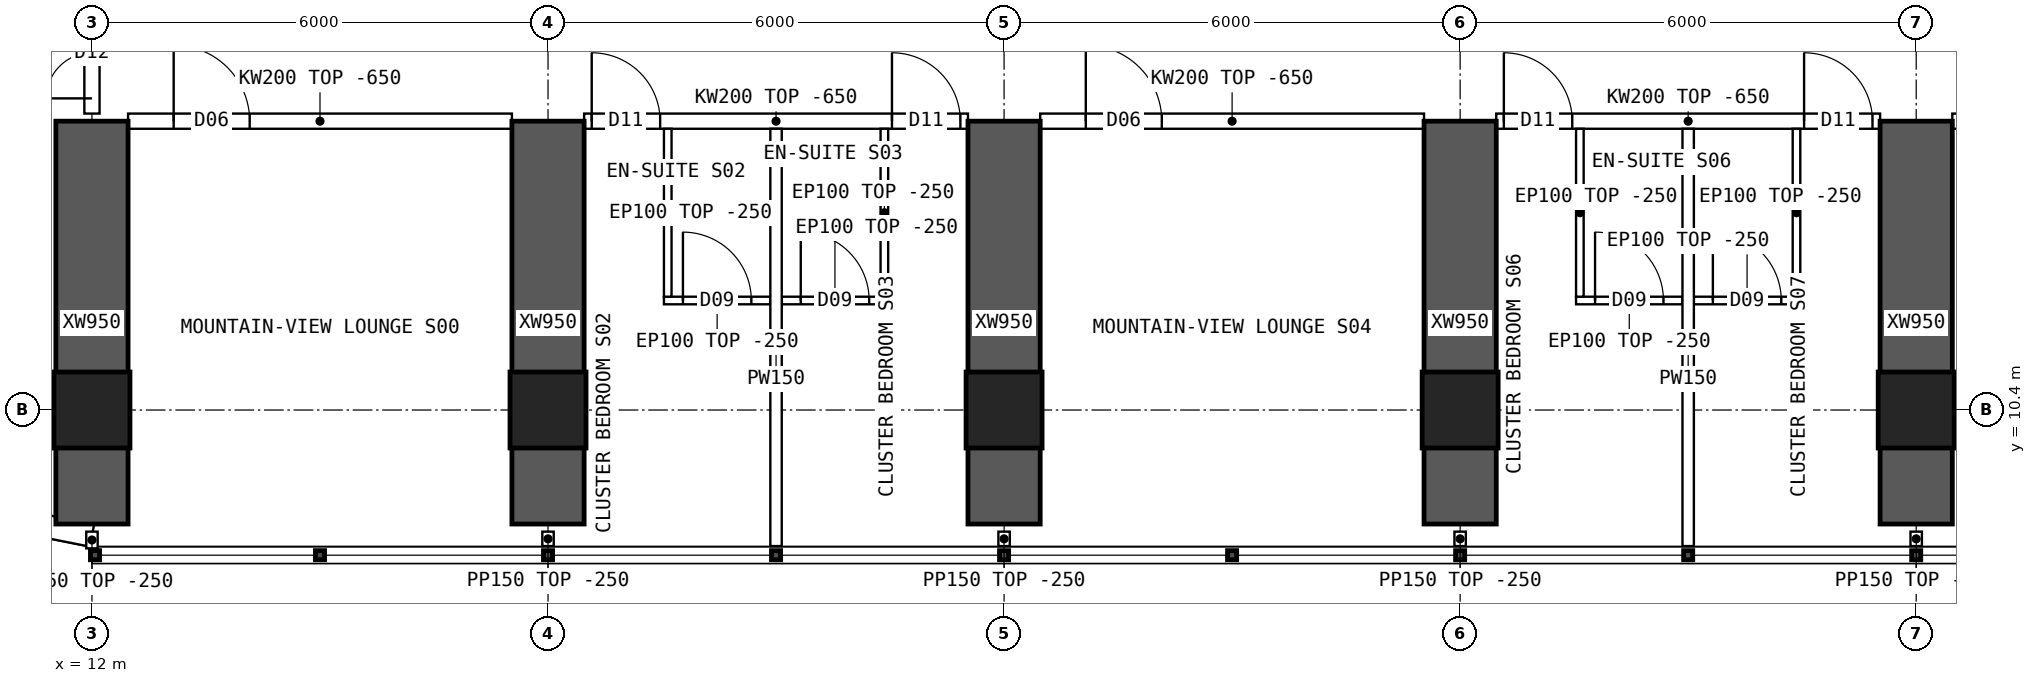
"""IFC4 building model, lengths in metres.
Left out: names, types, materials, properties, quantities, classifications, styles, units other than length and angle.
Written with IfcOpenShell. Run it as: python <this file> out.ifc"""

import sys

from ifc_helpers import new_model, si_unit, direction, frame, frame_2d, origin, origin_2d, place, context, subcontext, project, spatial, polyline, rectangle, hollow_rectangle, outline, extrude, element, fill, save


model = new_model("IFC4")
c1 = context("Model", 3, precision=1e-05, world=origin(), true_north=direction((0.0, 1.0)))
c2 = subcontext(c1, "Body", "Model", "MODEL_VIEW")
j1 = project(units=[si_unit("LENGTHUNIT", "METRE"), si_unit("PLANEANGLEUNIT", "RADIAN")], contexts=[c1])
p1 = place(None, origin())
s1 = spatial("IfcSite", under=j1, at=p1, CompositionType="ELEMENT")
p2 = place(p1, origin())
s2 = spatial("IfcBuilding", under=s1, at=p2, CompositionType="ELEMENT")
p3 = place(p2, frame((0.0, 0.0, 99.4)))
s3 = spatial("IfcBuildingStorey", under=s2, at=p3, CompositionType="ELEMENT", Elevation=99.4)
for number, where, z_axis, x_axis in (
    (1, (12.0, 10.4, 0.0), (0.0, 0.0, 1.0), (1.0, 0.0, 0.0)),
    (2, (18.0, 10.4, 0.0), (0.0, 0.0, 1.0), (1.0, 0.0, 0.0)),
    (3, (24.0, 10.4, 0.0), (0.0, 0.0, 1.0), (1.0, 0.0, 0.0)),
    (4, (30.0, 10.4, 0.0), (0.0, 0.0, 1.0), (1.0, 0.0, 0.0)),
    (5, (36.0, 10.4, 0.0), (0.0, 0.0, 1.0), (1.0, 0.0, 0.0)),
):
    element("IfcColumn", number, at=place(p3, frame(where, z_axis=z_axis, x_axis=x_axis)), inside=s3, PredefinedType="COLUMN", context=c2, shape_type="SweptSolid", body=[
        extrude(hollow_rectangle(XDim=1.0, YDim=1.0, WallThickness=0.1, at=origin_2d()), origin(), (0.0, 0.0, 1.0), 3.75),
    ])
for number, where, z_axis, x_axis in (
    (6, (12.0, 8.9, 0.0), (0.0, 0.0, 1.0), (0.0, 1.0, 0.0)),
    (7, (18.0, 8.9, 0.0), (0.0, 0.0, 1.0), (0.0, 1.0, 0.0)),
    (8, (24.0, 8.9, 0.0), (0.0, 0.0, 1.0), (0.0, 1.0, 0.0)),
    (9, (30.0, 8.9, 0.0), (0.0, 0.0, 1.0), (0.0, 1.0, 0.0)),
    (10, (36.0, 8.9, 0.0), (0.0, 0.0, 1.0), (0.0, 1.0, 0.0)),
):
    element("IfcWall", number, at=place(p3, frame(where, z_axis=z_axis, x_axis=x_axis)), inside=s3, PredefinedType="SHEAR", context=c2, shape_type="SweptSolid", body=[
        extrude(rectangle(XDim=5.3, YDim=0.95, at=frame_2d((2.65, 0.0))), origin(), (0.0, 0.0, 1.0), 3.75),
    ])
p4 = place(p3, frame((8.843, 9.378, 0.0), z_axis=(0.0, 0.0, 1.0), x_axis=(0.980787251524, -0.195080412259, 0.0)))
e11 = element("IfcWall", 11, at=p4, inside=s3, PredefinedType="SOLIDWALL", context=c2, shape_type="SweptSolid", body=[
    extrude(outline(polyline([(-0.03, -0.15), (3.249, -0.15), (3.189, 0.15), (0.03, 0.15), (-0.03, -0.15)])), origin(), (0.0, 0.0, 1.0), 3.5),
])
p5 = place(p4, frame((0.909, 0.0, 0.9)))
e12 = element("IfcOpeningElement", 12, at=p5, cuts=e11, PredefinedType="OPENING", context=c2, shape_type="SweptSolid", body=[
    extrude(rectangle(XDim=1.4, YDim=1.8, at=frame_2d((0.7, 0.9))), frame((0.0, 0.16, 0.0), z_axis=(0.0, -1.0, 0.0), x_axis=(1.0, 0.0, 0.0)), (0.0, 0.0, 1.0), 0.32),
])
p6 = place(p3, frame((12.475, 14.2, 0.0), z_axis=(0.0, 0.0, 1.0), x_axis=(1.0, 0.0, 0.0)))
e13 = element("IfcWall", 13, at=p6, inside=s3, PredefinedType="SOLIDWALL", context=c2, shape_type="SweptSolid", body=[
    extrude(outline(polyline([(0.0, 0.0), (5.05, 0.0), (5.05, 3.1), (0.0, 3.1), (0.0, 0.0)])), frame((0.0, 0.1, 0.0), z_axis=(0.0, -1.0, 0.0), x_axis=(1.0, 0.0, 0.0)), (0.0, 0.0, 1.0), 0.2),
])
p7 = place(p6, frame((0.6, 0.0, 0.0)))
e14 = element("IfcOpeningElement", 14, at=p7, cuts=e13, PredefinedType="OPENING", context=c2, shape_type="SweptSolid", body=[
    extrude(rectangle(XDim=1.0, YDim=2.1, at=frame_2d((0.5, 1.05))), frame((0.0, 0.11, 0.0), z_axis=(0.0, -1.0, 0.0), x_axis=(1.0, 0.0, 0.0)), (0.0, 0.0, 1.0), 0.22),
])
p8 = place(p3, frame((18.475, 14.2, 0.0), z_axis=(0.0, 0.0, 1.0), x_axis=(1.0, 0.0, 0.0)))
e15 = element("IfcWall", 15, at=p8, inside=s3, PredefinedType="SOLIDWALL", context=c2, shape_type="SweptSolid", body=[
    extrude(outline(polyline([(0.0, 0.0), (5.05, 0.0), (5.05, 3.1), (0.0, 3.1), (0.0, 0.0)])), frame((0.0, 0.1, 0.0), z_axis=(0.0, -1.0, 0.0), x_axis=(1.0, 0.0, 0.0)), (0.0, 0.0, 1.0), 0.2),
])
p9 = place(p8, frame((0.1, 0.0, 0.0)))
e16 = element("IfcOpeningElement", 16, at=p9, cuts=e15, PredefinedType="OPENING", context=c2, shape_type="SweptSolid", body=[
    extrude(rectangle(XDim=0.9, YDim=2.1, at=frame_2d((0.45, 1.05))), frame((0.0, 0.11, 0.0), z_axis=(0.0, -1.0, 0.0), x_axis=(1.0, 0.0, 0.0)), (0.0, 0.0, 1.0), 0.22),
])
p10 = place(p8, frame((4.05, 0.0, 0.0)))
e17 = element("IfcOpeningElement", 17, at=p10, cuts=e15, PredefinedType="OPENING", context=c2, shape_type="SweptSolid", body=[
    extrude(rectangle(XDim=0.9, YDim=2.1, at=frame_2d((0.45, 1.05))), frame((0.0, 0.11, 0.0), z_axis=(0.0, -1.0, 0.0), x_axis=(1.0, 0.0, 0.0)), (0.0, 0.0, 1.0), 0.22),
])
p11 = place(p3, frame((24.475, 14.2, 0.0), z_axis=(0.0, 0.0, 1.0), x_axis=(1.0, 0.0, 0.0)))
e18 = element("IfcWall", 18, at=p11, inside=s3, PredefinedType="SOLIDWALL", context=c2, shape_type="SweptSolid", body=[
    extrude(outline(polyline([(0.0, 0.0), (5.05, 0.0), (5.05, 3.1), (0.0, 3.1), (0.0, 0.0)])), frame((0.0, 0.1, 0.0), z_axis=(0.0, -1.0, 0.0), x_axis=(1.0, 0.0, 0.0)), (0.0, 0.0, 1.0), 0.2),
])
p12 = place(p11, frame((0.6, 0.0, 0.0)))
e19 = element("IfcOpeningElement", 19, at=p12, cuts=e18, PredefinedType="OPENING", context=c2, shape_type="SweptSolid", body=[
    extrude(rectangle(XDim=1.0, YDim=2.1, at=frame_2d((0.5, 1.05))), frame((0.0, 0.11, 0.0), z_axis=(0.0, -1.0, 0.0), x_axis=(1.0, 0.0, 0.0)), (0.0, 0.0, 1.0), 0.22),
])
p13 = place(p3, frame((30.475, 14.2, 0.0), z_axis=(0.0, 0.0, 1.0), x_axis=(1.0, 0.0, 0.0)))
e20 = element("IfcWall", 20, at=p13, inside=s3, PredefinedType="SOLIDWALL", context=c2, shape_type="SweptSolid", body=[
    extrude(outline(polyline([(0.0, 0.0), (5.05, 0.0), (5.05, 3.1), (0.0, 3.1), (0.0, 0.0)])), frame((0.0, 0.1, 0.0), z_axis=(0.0, -1.0, 0.0), x_axis=(1.0, 0.0, 0.0)), (0.0, 0.0, 1.0), 0.2),
])
p14 = place(p13, frame((0.1, 0.0, 0.0)))
e21 = element("IfcOpeningElement", 21, at=p14, cuts=e20, PredefinedType="OPENING", context=c2, shape_type="SweptSolid", body=[
    extrude(rectangle(XDim=0.9, YDim=2.1, at=frame_2d((0.45, 1.05))), frame((0.0, 0.11, 0.0), z_axis=(0.0, -1.0, 0.0), x_axis=(1.0, 0.0, 0.0)), (0.0, 0.0, 1.0), 0.22),
])
p15 = place(p13, frame((4.05, 0.0, 0.0)))
e22 = element("IfcOpeningElement", 22, at=p15, cuts=e20, PredefinedType="OPENING", context=c2, shape_type="SweptSolid", body=[
    extrude(rectangle(XDim=0.9, YDim=2.1, at=frame_2d((0.45, 1.05))), frame((0.0, 0.11, 0.0), z_axis=(0.0, -1.0, 0.0), x_axis=(1.0, 0.0, 0.0)), (0.0, 0.0, 1.0), 0.22),
])
p16 = place(p3, frame((36.475, 14.2, 0.0), z_axis=(0.0, 0.0, 1.0), x_axis=(1.0, 0.0, 0.0)))
e23 = element("IfcWall", 23, at=p16, inside=s3, PredefinedType="SOLIDWALL", context=c2, shape_type="SweptSolid", body=[
    extrude(outline(polyline([(0.0, 0.0), (5.05, 0.0), (5.05, 3.1), (0.0, 3.1), (0.0, 0.0)])), frame((0.0, 0.1, 0.0), z_axis=(0.0, -1.0, 0.0), x_axis=(1.0, 0.0, 0.0)), (0.0, 0.0, 1.0), 0.2),
])
p17 = place(p16, frame((0.3, 0.0, 0.0)))
e24 = element("IfcOpeningElement", 24, at=p17, cuts=e23, PredefinedType="OPENING", context=c2, shape_type="SweptSolid", body=[
    extrude(rectangle(XDim=1.0, YDim=2.1, at=frame_2d((0.5, 1.05))), frame((0.0, 0.11, 0.0), z_axis=(0.0, -1.0, 0.0), x_axis=(1.0, 0.0, 0.0)), (0.0, 0.0, 1.0), 0.22),
])
p18 = place(p3, frame((21.0, 8.61, 0.0), z_axis=(0.0, 0.0, 1.0), x_axis=(0.0, 1.0, 0.0)))
e25 = element("IfcWall", 25, at=p18, inside=s3, PredefinedType="PARTITIONING", context=c2, shape_type="SweptSolid", body=[
    extrude(outline(polyline([(0.0, 0.0), (5.49, 0.0), (5.49, 3.1), (5.442, 3.1), (5.44, 3.5), (1.992, 3.5), (1.99, 3.1), (1.592, 3.1), (1.59, 3.5), (0.0, 3.5), (0.0, 0.0)])), frame((0.0, 0.075, 0.0), z_axis=(0.0, -1.0, 0.0), x_axis=(1.0, 0.0, 0.0)), (0.0, 0.0, 1.0), 0.15),
])
p19 = place(p3, frame((20.925, 11.841, 0.0), z_axis=(0.0, 0.0, 1.0), x_axis=(-1.0, 0.0, 0.0)))
e26 = element("IfcWall", 26, at=p19, inside=s3, PredefinedType="PARTITIONING", context=c2, shape_type="SweptSolid", body=[
    extrude(rectangle(XDim=1.4, YDim=0.1, at=frame_2d((0.7, 0.0))), origin(), (0.0, 0.0, 1.0), 3.5),
])
p20 = place(p19, frame((0.25, 0.0, 0.0)))
e27 = element("IfcOpeningElement", 27, at=p20, cuts=e26, PredefinedType="OPENING", context=c2, shape_type="SweptSolid", body=[
    extrude(rectangle(XDim=0.9, YDim=2.1, at=frame_2d((0.45, 1.05))), frame((0.0, 0.06, 0.0), z_axis=(0.0, -1.0, 0.0), x_axis=(1.0, 0.0, 0.0)), (0.0, 0.0, 1.0), 0.12),
])
p21 = place(p3, frame((19.575, 11.891, 0.0), z_axis=(0.0, 0.0, 1.0), x_axis=(0.0, 1.0, 0.0)))
e28 = element("IfcWall", 28, at=p21, inside=s3, PredefinedType="PARTITIONING", context=c2, shape_type="SweptSolid", body=[
    extrude(outline(polyline([(0.0, 0.0), (2.209, 0.0), (2.209, 3.1), (2.161, 3.1), (2.159, 3.5), (0.0, 3.5), (0.0, 0.0)])), frame((0.0, 0.05, 0.0), z_axis=(0.0, -1.0, 0.0), x_axis=(1.0, 0.0, 0.0)), (0.0, 0.0, 1.0), 0.1),
])
p22 = place(p3, frame((22.475, 11.841, 0.0), z_axis=(0.0, 0.0, 1.0), x_axis=(-1.0, 0.0, 0.0)))
e29 = element("IfcWall", 29, at=p22, inside=s3, PredefinedType="PARTITIONING", context=c2, shape_type="SweptSolid", body=[
    extrude(rectangle(XDim=1.4, YDim=0.1, at=frame_2d((0.7, 0.0))), origin(), (0.0, 0.0, 1.0), 3.5),
])
p23 = place(p22, frame((0.25, 0.0, 0.0)))
e30 = element("IfcOpeningElement", 30, at=p23, cuts=e29, PredefinedType="OPENING", context=c2, shape_type="SweptSolid", body=[
    extrude(rectangle(XDim=0.9, YDim=2.1, at=frame_2d((0.45, 1.05))), frame((0.0, 0.06, 0.0), z_axis=(0.0, -1.0, 0.0), x_axis=(1.0, 0.0, 0.0)), (0.0, 0.0, 1.0), 0.12),
])
p24 = place(p3, frame((22.425, 11.891, 0.0), z_axis=(0.0, 0.0, 1.0), x_axis=(0.0, 1.0, 0.0)))
e31 = element("IfcWall", 31, at=p24, inside=s3, PredefinedType="PARTITIONING", context=c2, shape_type="SweptSolid", body=[
    extrude(outline(polyline([(0.0, 0.0), (2.209, 0.0), (2.209, 3.1), (2.161, 3.1), (2.159, 3.5), (0.0, 3.5), (0.0, 0.0)])), frame((0.0, 0.05, 0.0), z_axis=(0.0, -1.0, 0.0), x_axis=(1.0, 0.0, 0.0)), (0.0, 0.0, 1.0), 0.1),
])
p25 = place(p3, frame((33.0, 8.61, 0.0), z_axis=(0.0, 0.0, 1.0), x_axis=(0.0, 1.0, 0.0)))
e32 = element("IfcWall", 32, at=p25, inside=s3, PredefinedType="PARTITIONING", context=c2, shape_type="SweptSolid", body=[
    extrude(outline(polyline([(0.0, 0.0), (5.49, 0.0), (5.49, 3.1), (5.442, 3.1), (5.44, 3.5), (1.992, 3.5), (1.99, 3.1), (1.592, 3.1), (1.59, 3.5), (0.0, 3.5), (0.0, 0.0)])), frame((0.0, 0.075, 0.0), z_axis=(0.0, -1.0, 0.0), x_axis=(1.0, 0.0, 0.0)), (0.0, 0.0, 1.0), 0.15),
])
p26 = place(p3, frame((32.925, 11.841, 0.0), z_axis=(0.0, 0.0, 1.0), x_axis=(-1.0, 0.0, 0.0)))
e33 = element("IfcWall", 33, at=p26, inside=s3, PredefinedType="PARTITIONING", context=c2, shape_type="SweptSolid", body=[
    extrude(rectangle(XDim=1.4, YDim=0.1, at=frame_2d((0.7, 0.0))), origin(), (0.0, 0.0, 1.0), 3.5),
])
p27 = place(p26, frame((0.25, 0.0, 0.0)))
e34 = element("IfcOpeningElement", 34, at=p27, cuts=e33, PredefinedType="OPENING", context=c2, shape_type="SweptSolid", body=[
    extrude(rectangle(XDim=0.9, YDim=2.1, at=frame_2d((0.45, 1.05))), frame((0.0, 0.06, 0.0), z_axis=(0.0, -1.0, 0.0), x_axis=(1.0, 0.0, 0.0)), (0.0, 0.0, 1.0), 0.12),
])
p28 = place(p3, frame((31.575, 11.891, 0.0), z_axis=(0.0, 0.0, 1.0), x_axis=(0.0, 1.0, 0.0)))
e35 = element("IfcWall", 35, at=p28, inside=s3, PredefinedType="PARTITIONING", context=c2, shape_type="SweptSolid", body=[
    extrude(outline(polyline([(0.0, 0.0), (2.209, 0.0), (2.209, 3.1), (2.161, 3.1), (2.159, 3.5), (0.0, 3.5), (0.0, 0.0)])), frame((0.0, 0.05, 0.0), z_axis=(0.0, -1.0, 0.0), x_axis=(1.0, 0.0, 0.0)), (0.0, 0.0, 1.0), 0.1),
])
p29 = place(p3, frame((34.475, 11.841, 0.0), z_axis=(0.0, 0.0, 1.0), x_axis=(-1.0, 0.0, 0.0)))
e36 = element("IfcWall", 36, at=p29, inside=s3, PredefinedType="PARTITIONING", context=c2, shape_type="SweptSolid", body=[
    extrude(rectangle(XDim=1.4, YDim=0.1, at=frame_2d((0.7, 0.0))), origin(), (0.0, 0.0, 1.0), 3.5),
])
p30 = place(p29, frame((0.25, 0.0, 0.0)))
e37 = element("IfcOpeningElement", 37, at=p30, cuts=e36, PredefinedType="OPENING", context=c2, shape_type="SweptSolid", body=[
    extrude(rectangle(XDim=0.9, YDim=2.1, at=frame_2d((0.45, 1.05))), frame((0.0, 0.06, 0.0), z_axis=(0.0, -1.0, 0.0), x_axis=(1.0, 0.0, 0.0)), (0.0, 0.0, 1.0), 0.12),
])
p31 = place(p3, frame((34.425, 11.891, 0.0), z_axis=(0.0, 0.0, 1.0), x_axis=(0.0, 1.0, 0.0)))
e38 = element("IfcWall", 38, at=p31, inside=s3, PredefinedType="PARTITIONING", context=c2, shape_type="SweptSolid", body=[
    extrude(outline(polyline([(0.0, 0.0), (2.209, 0.0), (2.209, 3.1), (2.161, 3.1), (2.159, 3.5), (0.0, 3.5), (0.0, 0.0)])), frame((0.0, 0.05, 0.0), z_axis=(0.0, -1.0, 0.0), x_axis=(1.0, 0.0, 0.0)), (0.0, 0.0, 1.0), 0.1),
])
p32 = place(p3, frame((12.0, 14.3, 0.0), z_axis=(0.0, 0.0, 1.0), x_axis=(0.0, 1.0, 0.0)))
e39 = element("IfcWall", 39, at=p32, inside=s3, PredefinedType="SOLIDWALL", context=c2, shape_type="SweptSolid", body=[
    extrude(outline(polyline([(0.0, 0.0), (1.6, 0.0), (1.6, 3.1), (0.0, 3.1), (0.0, 0.0)])), frame((0.0, 0.1, 0.0), z_axis=(0.0, -1.0, 0.0), x_axis=(1.0, 0.0, 0.0)), (0.0, 0.0, 1.0), 0.2),
])
p33 = place(p32, frame((0.2, 0.0, 0.0)))
e40 = element("IfcOpeningElement", 40, at=p33, cuts=e39, PredefinedType="OPENING", context=c2, shape_type="SweptSolid", body=[
    extrude(rectangle(XDim=1.2, YDim=2.1, at=frame_2d((0.6, 1.05))), frame((0.0, 0.11, 0.0), z_axis=(0.0, -1.0, 0.0), x_axis=(1.0, 0.0, 0.0)), (0.0, 0.0, 1.0), 0.22),
])
p34 = place(p3, frame((12.0, 8.8, 0.0), z_axis=(0.0, 0.0, 1.0), x_axis=(0.0, -1.0, 0.0)))
e41 = element("IfcWall", 41, at=p34, inside=s3, PredefinedType="PARTITIONING", context=c2, shape_type="SweptSolid", body=[
    extrude(rectangle(XDim=0.22, YDim=0.15, at=frame_2d((0.11, 0.0))), origin(), (0.0, 0.0, 1.0), 3.5),
])
for number, where, z_axis, x_axis in (
    (42, (18.0, 8.8, 0.0), (0.0, 0.0, 1.0), (0.0, -1.0, 0.0)),
    (43, (24.0, 8.8, 0.0), (0.0, 0.0, 1.0), (0.0, -1.0, 0.0)),
    (44, (30.0, 8.8, 0.0), (0.0, 0.0, 1.0), (0.0, -1.0, 0.0)),
    (45, (36.0, 8.8, 0.0), (0.0, 0.0, 1.0), (0.0, -1.0, 0.0)),
):
    element("IfcWall", number, at=place(p3, frame(where, z_axis=z_axis, x_axis=x_axis)), inside=s3, PredefinedType="PARTITIONING", context=c2, shape_type="SweptSolid", body=[
        extrude(rectangle(XDim=0.19, YDim=0.15, at=frame_2d((0.095, 0.0))), origin(), (0.0, 0.0, 1.0), 3.5),
    ])
p35 = place(p7, origin())
e46 = element("IfcDoor", 46, at=p35, inside=s3, OperationType="SINGLE_SWING_LEFT", PredefinedType="DOOR", context=c2, shape_type="SweptSolid", body=[
    extrude(rectangle(XDim=1.0, YDim=2.1, at=frame_2d((0.5, 1.05))), frame((0.0, 0.025, 0.0), z_axis=(0.0, -1.0, 0.0), x_axis=(1.0, 0.0, 0.0)), (0.0, 0.0, 1.0), 0.05),
])
fill(e14, e46)
p36 = place(p20, origin())
e47 = element("IfcDoor", 47, at=p36, inside=s3, OperationType="SINGLE_SWING_RIGHT", PredefinedType="DOOR", context=c2, shape_type="SweptSolid", body=[
    extrude(rectangle(XDim=0.9, YDim=2.1, at=frame_2d((0.45, 1.05))), frame((0.0, 0.025, 0.0), z_axis=(0.0, -1.0, 0.0), x_axis=(1.0, 0.0, 0.0)), (0.0, 0.0, 1.0), 0.05),
])
fill(e27, e47)
p37 = place(p9, origin())
e48 = element("IfcDoor", 48, at=p37, inside=s3, OperationType="SINGLE_SWING_LEFT", PredefinedType="DOOR", context=c2, shape_type="SweptSolid", body=[
    extrude(rectangle(XDim=0.9, YDim=2.1, at=frame_2d((0.45, 1.05))), frame((0.0, 0.025, 0.0), z_axis=(0.0, -1.0, 0.0), x_axis=(1.0, 0.0, 0.0)), (0.0, 0.0, 1.0), 0.05),
])
fill(e16, e48)
p38 = place(p23, origin())
e49 = element("IfcDoor", 49, at=p38, inside=s3, OperationType="SINGLE_SWING_RIGHT", PredefinedType="DOOR", context=c2, shape_type="SweptSolid", body=[
    extrude(rectangle(XDim=0.9, YDim=2.1, at=frame_2d((0.45, 1.05))), frame((0.0, 0.025, 0.0), z_axis=(0.0, -1.0, 0.0), x_axis=(1.0, 0.0, 0.0)), (0.0, 0.0, 1.0), 0.05),
])
fill(e30, e49)
p39 = place(p10, origin())
e50 = element("IfcDoor", 50, at=p39, inside=s3, OperationType="SINGLE_SWING_LEFT", PredefinedType="DOOR", context=c2, shape_type="SweptSolid", body=[
    extrude(rectangle(XDim=0.9, YDim=2.1, at=frame_2d((0.45, 1.05))), frame((0.0, 0.025, 0.0), z_axis=(0.0, -1.0, 0.0), x_axis=(1.0, 0.0, 0.0)), (0.0, 0.0, 1.0), 0.05),
])
fill(e17, e50)
p40 = place(p12, origin())
e51 = element("IfcDoor", 51, at=p40, inside=s3, OperationType="SINGLE_SWING_LEFT", PredefinedType="DOOR", context=c2, shape_type="SweptSolid", body=[
    extrude(rectangle(XDim=1.0, YDim=2.1, at=frame_2d((0.5, 1.05))), frame((0.0, 0.025, 0.0), z_axis=(0.0, -1.0, 0.0), x_axis=(1.0, 0.0, 0.0)), (0.0, 0.0, 1.0), 0.05),
])
fill(e19, e51)
p41 = place(p27, origin())
e52 = element("IfcDoor", 52, at=p41, inside=s3, OperationType="SINGLE_SWING_RIGHT", PredefinedType="DOOR", context=c2, shape_type="SweptSolid", body=[
    extrude(rectangle(XDim=0.9, YDim=2.1, at=frame_2d((0.45, 1.05))), frame((0.0, 0.025, 0.0), z_axis=(0.0, -1.0, 0.0), x_axis=(1.0, 0.0, 0.0)), (0.0, 0.0, 1.0), 0.05),
])
fill(e34, e52)
p42 = place(p14, origin())
e53 = element("IfcDoor", 53, at=p42, inside=s3, OperationType="SINGLE_SWING_LEFT", PredefinedType="DOOR", context=c2, shape_type="SweptSolid", body=[
    extrude(rectangle(XDim=0.9, YDim=2.1, at=frame_2d((0.45, 1.05))), frame((0.0, 0.025, 0.0), z_axis=(0.0, -1.0, 0.0), x_axis=(1.0, 0.0, 0.0)), (0.0, 0.0, 1.0), 0.05),
])
fill(e21, e53)
p43 = place(p30, origin())
e54 = element("IfcDoor", 54, at=p43, inside=s3, OperationType="SINGLE_SWING_RIGHT", PredefinedType="DOOR", context=c2, shape_type="SweptSolid", body=[
    extrude(rectangle(XDim=0.9, YDim=2.1, at=frame_2d((0.45, 1.05))), frame((0.0, 0.025, 0.0), z_axis=(0.0, -1.0, 0.0), x_axis=(1.0, 0.0, 0.0)), (0.0, 0.0, 1.0), 0.05),
])
fill(e37, e54)
p44 = place(p15, origin())
e55 = element("IfcDoor", 55, at=p44, inside=s3, OperationType="SINGLE_SWING_LEFT", PredefinedType="DOOR", context=c2, shape_type="SweptSolid", body=[
    extrude(rectangle(XDim=0.9, YDim=2.1, at=frame_2d((0.45, 1.05))), frame((0.0, 0.025, 0.0), z_axis=(0.0, -1.0, 0.0), x_axis=(1.0, 0.0, 0.0)), (0.0, 0.0, 1.0), 0.05),
])
fill(e22, e55)
p45 = place(p33, origin())
e56 = element("IfcDoor", 56, at=p45, inside=s3, OperationType="DOUBLE_DOOR_SINGLE_SWING", PredefinedType="DOOR", context=c2, shape_type="SweptSolid", body=[
    extrude(rectangle(XDim=1.2, YDim=2.1, at=frame_2d((0.6, 1.05))), frame((0.0, 0.025, 0.0), z_axis=(0.0, -1.0, 0.0), x_axis=(1.0, 0.0, 0.0)), (0.0, 0.0, 1.0), 0.05),
])
fill(e40, e56)
save(model, sys.argv[1])
